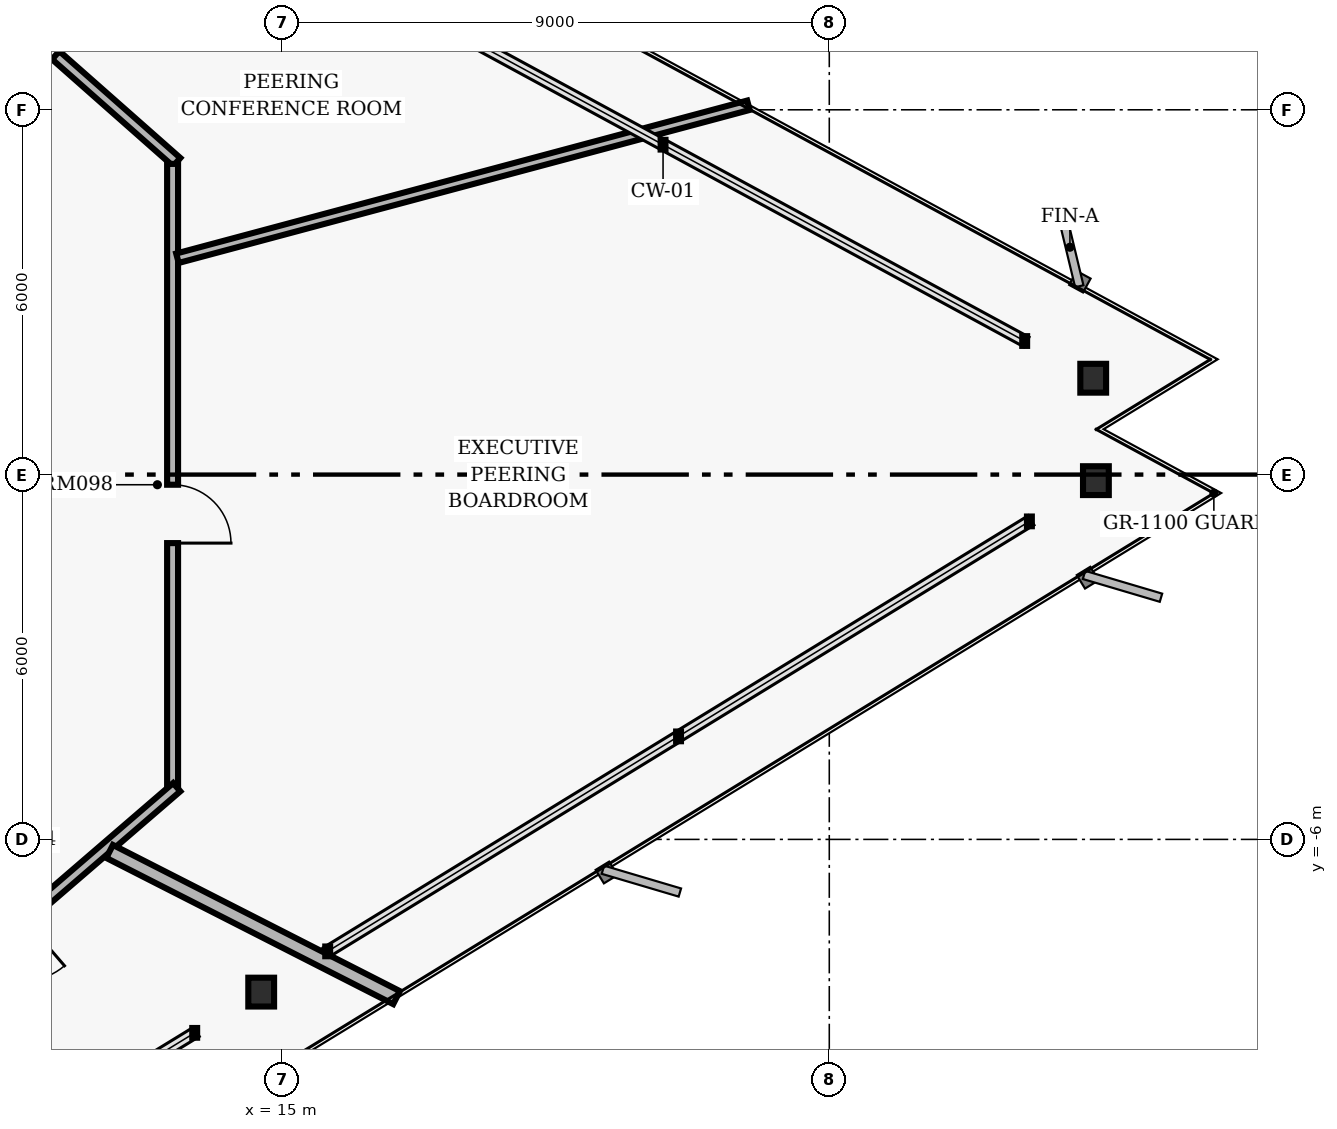
"""IFC4 building model, lengths in metres.
Left out: names, types, materials, properties, quantities, classifications, styles, units other than length and angle.
Written with IfcOpenShell. Run it as: python <this file> out.ifc"""

import sys

from ifc_helpers import new_model, si_unit, direction, frame, frame_2d, origin, origin_2d, place, context, subcontext, project, spatial, rectangle, i_section, extrude, element, fill, save


model = new_model("IFC4")
c1 = context("Model", 3, precision=1e-05, world=origin(), true_north=direction((0.0, 1.0)))
c2 = subcontext(c1, "Body", "Model", "MODEL_VIEW")
j1 = project(units=[si_unit("LENGTHUNIT", "METRE"), si_unit("PLANEANGLEUNIT", "RADIAN")], contexts=[c1])
p1 = place(None, origin())
s1 = spatial("IfcSite", under=j1, at=p1, CompositionType="ELEMENT")
p2 = place(p1, origin())
s2 = spatial("IfcBuilding", under=s1, at=p2, CompositionType="ELEMENT")
p3 = place(p2, frame((0.0, 0.0, 32.32)))
s3 = spatial("IfcBuildingStorey", under=s2, at=p3, CompositionType="ELEMENT", Elevation=32.32)
for number, where, z_axis, x_axis in (
    (1, (28.341, 1.585, 0.0), (0.0, 0.0, 1.0), (1.0, 0.0, 0.0)),
    (2, (14.657, -8.512, 0.0), (0.0, 0.0, 1.0), (1.0, 0.0, 0.0)),
    (3, (28.385, -0.1, 0.0), (0.0, 0.0, 1.0), (1.0, 0.0, 0.0)),
):
    element("IfcColumn", number, at=place(p3, frame(where, z_axis=z_axis, x_axis=x_axis)), inside=s3, PredefinedType="COLUMN", context=c2, shape_type="SweptSolid", body=[
        extrude(i_section(OverallWidth=0.424, OverallDepth=0.474, WebThickness=0.048, FlangeThickness=0.077, FilletRadius=0.025, at=origin_2d()), origin(), (0.0, 0.0, 1.0), 3.36),
    ])
p4 = place(p3, frame((8.567, 9.29, 0.0), z_axis=(0.0, 0.0, 1.0), x_axis=(0.749626463267, -0.66186113768, 0.0)))
e4 = element("IfcWall", 4, at=p4, inside=s3, PredefinedType="PARTITIONING", context=c2, shape_type="SweptSolid", body=[
    extrude(rectangle(XDim=6.27, YDim=0.18, at=frame_2d((3.135, 0.0))), origin(), (0.0, 0.0, 1.0), 2.587),
])
p5 = place(p4, frame((2.655, 0.0, 0.0)))
e5 = element("IfcOpeningElement", 5, at=p5, cuts=e4, PredefinedType="OPENING", context=c2, shape_type="SweptSolid", body=[
    extrude(rectangle(XDim=0.96, YDim=2.02, at=frame_2d((0.48, 1.01))), frame((0.0, 0.1, 0.0), z_axis=(0.0, -1.0, 0.0), x_axis=(1.0, 0.0, 0.0)), (0.0, 0.0, 1.0), 0.2),
])
p6 = place(p3, frame((13.2, 5.11, 0.0), z_axis=(0.0, 0.0, 1.0), x_axis=(0.0, -1.0, 0.0)))
e6 = element("IfcWall", 6, at=p6, inside=s3, PredefinedType="PARTITIONING", context=c2, shape_type="SweptSolid", body=[
    extrude(rectangle(XDim=10.22, YDim=0.18, at=frame_2d((5.11, 0.0))), origin(), (0.0, 0.0, 1.0), 3.073),
])
p7 = place(p6, frame((5.277, 0.0, 0.0)))
e7 = element("IfcOpeningElement", 7, at=p7, cuts=e6, PredefinedType="OPENING", context=c2, shape_type="SweptSolid", body=[
    extrude(rectangle(XDim=0.96, YDim=2.02, at=frame_2d((0.48, 1.01))), frame((0.0, 0.1, 0.0), z_axis=(0.0, -1.0, 0.0), x_axis=(1.0, 0.0, 0.0)), (0.0, 0.0, 1.0), 0.2),
])
p8 = place(p3, frame((13.268, -5.141, 0.0), z_axis=(0.0, 0.0, 1.0), x_axis=(-0.757534501725, -0.65279512766, 0.0)))
e8 = element("IfcWall", 8, at=p8, inside=s3, PredefinedType="PARTITIONING", context=c2, shape_type="SweptSolid", body=[
    extrude(rectangle(XDim=6.385, YDim=0.18, at=frame_2d((3.192, 0.0))), origin(), (0.0, 0.0, 1.0), 2.587),
])
p9 = place(p8, frame((3.316, 0.0, 0.0)))
e9 = element("IfcOpeningElement", 9, at=p9, cuts=e8, PredefinedType="OPENING", context=c2, shape_type="SweptSolid", body=[
    extrude(rectangle(XDim=1.02, YDim=2.02, at=frame_2d((0.51, 1.01))), frame((0.0, 0.1, 0.0), z_axis=(0.0, -1.0, 0.0), x_axis=(1.0, 0.0, 0.0)), (0.0, 0.0, 1.0), 0.2),
])
p10 = place(p3, frame((12.164, -6.198, 0.0), z_axis=(0.0, 0.0, 1.0), x_axis=(0.890999034188, -0.454005199394, 0.0)))
e10 = element("IfcWall", 10, at=p10, inside=s3, PredefinedType="PARTITIONING", context=c2, shape_type="SweptSolid", body=[
    extrude(rectangle(XDim=5.296, YDim=0.24, at=frame_2d((2.648, 0.0))), origin(), (0.0, 0.0, 1.0), 2.358),
])
p11 = place(p3, frame((13.28, 3.558, 0.0), z_axis=(0.0, 0.0, 1.0), x_axis=(0.965926641133, 0.258816004043, 0.0)))
e11 = element("IfcWall", 11, at=p11, inside=s3, PredefinedType="PARTITIONING", context=c2, shape_type="SweptSolid", body=[
    extrude(rectangle(XDim=9.722, YDim=0.16, at=frame_2d((4.861, 0.0))), origin(), (0.0, 0.0, 1.0), 3.073),
])
p12 = place(p7, origin())
e12 = element("IfcDoor", 12, at=p12, inside=s3, OperationType="SINGLE_SWING_RIGHT", PredefinedType="DOOR", context=c2, shape_type="SweptSolid", body=[
    extrude(rectangle(XDim=0.96, YDim=2.02, at=frame_2d((0.48, 1.01))), frame((0.0, 0.025, 0.0), z_axis=(0.0, -1.0, 0.0), x_axis=(1.0, 0.0, 0.0)), (0.0, 0.0, 1.0), 0.05),
])
fill(e7, e12)
p13 = place(p5, origin())
e13 = element("IfcDoor", 13, at=p13, inside=s3, OperationType="SINGLE_SWING_LEFT", PredefinedType="DOOR", context=c2, shape_type="SweptSolid", body=[
    extrude(rectangle(XDim=0.96, YDim=2.02, at=frame_2d((0.48, 1.01))), frame((0.0, 0.025, 0.0), z_axis=(0.0, -1.0, 0.0), x_axis=(1.0, 0.0, 0.0)), (0.0, 0.0, 1.0), 0.05),
])
fill(e5, e13)
save(model, sys.argv[1])
